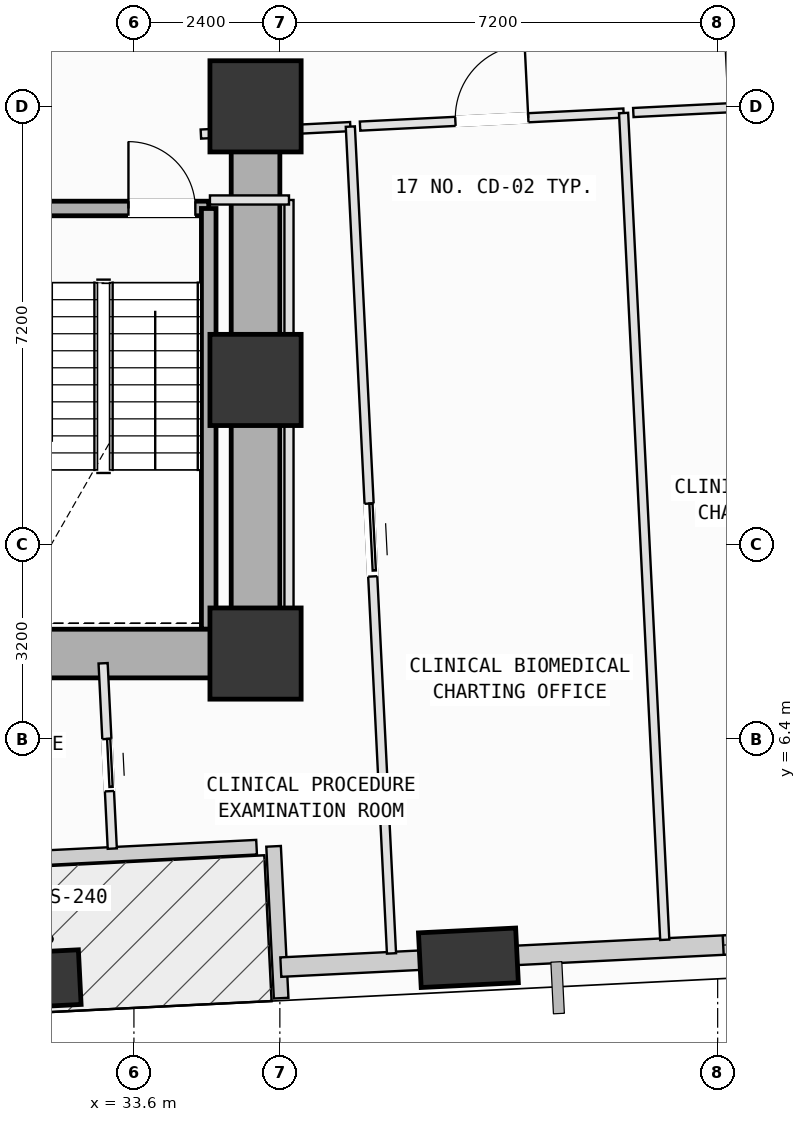
"""IFC4 building model, lengths in metres.
Left out: names, types, materials, properties, quantities, classifications, styles, units other than length and angle.
Written with IfcOpenShell. Run it as: python <this file> out.ifc"""

import sys

from ifc_helpers import new_model, si_unit, direction, frame, frame_2d, origin, origin_2d, place, context, subcontext, project, spatial, rectangle, extrude, element, fill, save


model = new_model("IFC4")
c1 = context("Model", 3, precision=1e-05, world=origin(), true_north=direction((0.0, 1.0)))
c2 = subcontext(c1, "Body", "Model", "MODEL_VIEW")
j1 = project(units=[si_unit("LENGTHUNIT", "METRE"), si_unit("PLANEANGLEUNIT", "RADIAN")], contexts=[c1])
p1 = place(None, origin())
s1 = spatial("IfcSite", under=j1, at=p1, CompositionType="ELEMENT")
p2 = place(p1, origin())
s2 = spatial("IfcBuilding", under=s1, at=p2, CompositionType="ELEMENT")
p3 = place(p2, frame((0.0, 0.0, 35.0)))
s3 = spatial("IfcBuildingStorey", under=s2, at=p3, CompositionType="ELEMENT", Elevation=35.0)
for number, where, z_axis, x_axis in (
    (1, (35.6, 7.8, 0.0), (0.0, 0.0, 1.0), (1.0, 0.0, 0.0)),
    (2, (35.6, 12.3, 0.0), (0.0, 0.0, 1.0), (1.0, 0.0, 0.0)),
    (3, (35.6, 16.8, 0.0), (0.0, 0.0, 1.0), (1.0, 0.0, 0.0)),
):
    element("IfcColumn", number, at=place(p3, frame(where, z_axis=z_axis, x_axis=x_axis)), inside=s3, PredefinedType="COLUMN", context=c2, shape_type="SweptSolid", body=[
        extrude(rectangle(XDim=1.5, YDim=1.5, at=origin_2d()), origin(), (0.0, 0.0, 1.0), 4.0),
    ])
p4 = place(p3, frame((31.91, 2.438, 0.002), z_axis=(0.092332687051, -0.006204172648, 0.995708884737), x_axis=(0.017562948544, 0.999835172037, 0.004601260333)))
e4 = element("IfcColumn", 4, at=p4, inside=s3, PredefinedType="COLUMN", context=c2, shape_type="SweptSolid", body=[
    extrude(rectangle(XDim=1.6, YDim=0.9, at=origin_2d()), origin(), (0.0, 0.0, 1.0), 4.014),
])
p5 = place(p3, frame((39.101, 2.796, 0.002), z_axis=(0.090620596554, 0.023415389043, 0.995610178251), x_axis=(-0.297792329454, 0.954619333029, 0.004653764671)))
e5 = element("IfcColumn", 5, at=p5, inside=s3, PredefinedType="COLUMN", context=c2, shape_type="SweptSolid", body=[
    extrude(rectangle(XDim=1.6, YDim=0.9, at=origin_2d()), origin(), (0.0, 0.0, 1.0), 4.014),
])
p6 = place(p3, frame((35.617, 4.615, 0.0), z_axis=(0.0, 0.0, 1.0), x_axis=(-0.998763945983, -0.04970493139, 0.0)))
e6 = element("IfcWall", 6, at=p6, inside=s3, PredefinedType="SOLIDWALL", context=c2, shape_type="SweptSolid", body=[
    extrude(rectangle(XDim=6.96, YDim=0.24, at=frame_2d((3.48, 0.0))), origin(), (0.0, 0.0, 1.0), 3.165),
])
p7 = place(p6, frame((4.264, 0.0, 0.0)))
e7 = element("IfcOpeningElement", 7, at=p7, cuts=e6, PredefinedType="OPENING", context=c2, shape_type="SweptSolid", body=[
    extrude(rectangle(XDim=1.1, YDim=2.15, at=frame_2d((0.55, 1.075))), frame((0.0, 0.13, 0.0), z_axis=(0.0, -1.0, 0.0), x_axis=(1.0, 0.0, 0.0)), (0.0, 0.0, 1.0), 0.26),
])
p8 = place(p3, frame((36.021, 2.132, 0.0), z_axis=(0.0, 0.0, 1.0), x_axis=(-0.049708688114, 0.998763759017, 0.0)))
e8 = element("IfcWall", 8, at=p8, inside=s3, PredefinedType="SOLIDWALL", context=c2, shape_type="SweptSolid", body=[
    extrude(rectangle(XDim=2.5, YDim=0.24, at=frame_2d((1.25, 0.0))), origin(), (0.0, 0.0, 1.0), 3.165),
])
p9 = place(p3, frame((38.679, 2.775, 0.0), z_axis=(0.0, 0.0, 1.0), x_axis=(-0.998758724052, -0.049809749348, 0.0)))
e9 = element("IfcWall", 9, at=p9, inside=s3, PredefinedType="SOLIDWALL", context=c2, shape_type="SweptSolid", body=[
    extrude(rectangle(XDim=2.667, YDim=0.32, at=frame_2d((1.333, 0.0))), origin(), (0.0, 0.0, 1.0), 3.145),
])
p10 = place(p3, frame((45.876, 3.134, 0.0), z_axis=(0.0, 0.0, 1.0), x_axis=(-0.998764196625, -0.049699894762, 0.0)))
e10 = element("IfcWall", 10, at=p10, inside=s3, PredefinedType="SOLIDWALL", context=c2, shape_type="SweptSolid", body=[
    extrude(rectangle(XDim=5.993, YDim=0.32, at=frame_2d((2.997, 0.0))), origin(), (0.0, 0.0, 1.0), 3.145),
])
p11 = place(p10, frame((0.588, 0.0, 0.75)))
e11 = element("IfcOpeningElement", 11, at=p11, cuts=e10, PredefinedType="OPENING", context=c2, shape_type="SweptSolid", body=[
    extrude(rectangle(XDim=2.0, YDim=1.95, at=frame_2d((1.0, 0.975))), frame((0.0, 0.17, 0.0), z_axis=(0.0, -1.0, 0.0), x_axis=(1.0, 0.0, 0.0)), (0.0, 0.0, 1.0), 0.34),
])
p12 = place(p3, frame((31.37, 15.12, 0.0), z_axis=(0.0, 0.0, 1.0), x_axis=(1.0, 0.0, 0.0)))
e12 = element("IfcWall", 12, at=p12, inside=s3, PredefinedType="SOLIDWALL", context=c2, shape_type="SweptSolid", body=[
    extrude(rectangle(XDim=3.46, YDim=0.24, at=frame_2d((1.73, 0.0))), origin(), (0.0, 0.0, 1.0), 3.78),
])
p13 = place(p12, frame((2.14, 0.0, 0.0)))
e13 = element("IfcOpeningElement", 13, at=p13, cuts=e12, PredefinedType="OPENING", context=c2, shape_type="SweptSolid", body=[
    extrude(rectangle(XDim=1.1, YDim=2.15, at=frame_2d((0.55, 1.075))), frame((0.0, 0.13, 0.0), z_axis=(0.0, -1.0, 0.0), x_axis=(1.0, 0.0, 0.0)), (0.0, 0.0, 1.0), 0.26),
])
p14 = place(p3, frame((34.83, 15.12, 0.0), z_axis=(0.0, 0.0, 1.0), x_axis=(0.0, -1.0, 0.0)))
e14 = element("IfcWall", 14, at=p14, inside=s3, PredefinedType="SOLIDWALL", context=c2, shape_type="SweptSolid", body=[
    extrude(rectangle(XDim=6.92, YDim=0.24, at=frame_2d((3.46, 0.0))), origin(), (0.0, 0.0, 1.0), 3.78),
])
p15 = place(p3, frame((24.8, 7.8, 0.0), z_axis=(0.0, 0.0, 1.0), x_axis=(1.0, 0.0, 0.0)))
e15 = element("IfcWall", 15, at=p15, inside=s3, PredefinedType="SHEAR", context=c2, shape_type="SweptSolid", body=[
    extrude(rectangle(XDim=10.8, YDim=0.8, at=frame_2d((5.4, 0.0))), origin(), (0.0, 0.0, 1.0), 3.78),
])
p16 = place(p3, frame((35.6, 7.8, 0.0), z_axis=(0.0, 0.0, 1.0), x_axis=(0.0, 1.0, 0.0)))
e16 = element("IfcWall", 16, at=p16, inside=s3, PredefinedType="SHEAR", context=c2, shape_type="SweptSolid", body=[
    extrude(rectangle(XDim=9.0, YDim=0.8, at=frame_2d((4.5, 0.0))), origin(), (0.0, 0.0, 1.0), 3.78),
])
p17 = place(p3, frame((33.093, 7.64, 0.0), z_axis=(0.0, 0.0, 1.0), x_axis=(0.049442819508, -0.998776955881, 0.0)))
e17 = element("IfcWall", 17, at=p17, inside=s3, PredefinedType="PARTITIONING", context=c2, shape_type="SweptSolid", body=[
    extrude(rectangle(XDim=3.052, YDim=0.15, at=frame_2d((1.526, 0.0))), origin(), (0.0, 0.0, 1.0), 3.78),
])
p18 = place(p17, frame((1.246, 0.0, 0.0)))
e18 = element("IfcOpeningElement", 18, at=p18, cuts=e17, PredefinedType="OPENING", context=c2, shape_type="SweptSolid", body=[
    extrude(rectangle(XDim=0.86, YDim=2.06, at=frame_2d((0.43, 1.03))), frame((0.0, 0.085, 0.0), z_axis=(0.0, -1.0, 0.0), x_axis=(1.0, 0.0, 0.0)), (0.0, 0.0, 1.0), 0.17),
])
p19 = place(p3, frame((35.6, 7.5, 0.0), z_axis=(0.0, 0.0, 1.0), x_axis=(1.0, 0.0, 0.0)))
e19 = element("IfcWall", 19, at=p19, inside=s3, PredefinedType="PARTITIONING", context=c2, shape_type="SweptSolid", body=[
    extrude(rectangle(XDim=0.55, YDim=0.15, at=frame_2d((0.275, 0.0))), origin(), (0.0, 0.0, 1.0), 2.865),
])
p20 = place(p3, frame((36.15, 7.5, 0.0), z_axis=(0.0, 0.0, 1.0), x_axis=(0.0, 1.0, 0.0)))
e20 = element("IfcWall", 20, at=p20, inside=s3, PredefinedType="PARTITIONING", context=c2, shape_type="SweptSolid", body=[
    extrude(rectangle(XDim=7.76, YDim=0.15, at=frame_2d((3.88, 0.0))), origin(), (0.0, 0.0, 1.0), 3.78),
])
p21 = place(p3, frame((36.15, 15.26, 0.0), z_axis=(0.0, 0.0, 1.0), x_axis=(-1.0, 0.0, 0.0)))
e21 = element("IfcWall", 21, at=p21, inside=s3, PredefinedType="PARTITIONING", context=c2, shape_type="SweptSolid", body=[
    extrude(rectangle(XDim=1.3, YDim=0.15, at=frame_2d((0.65, 0.0))), origin(), (0.0, 0.0, 1.0), 3.78),
])
p22 = place(p3, frame((34.701, 16.344, 0.0), z_axis=(0.0, 0.0, 1.0), x_axis=(0.998749368523, 0.049996988651, 0.0)))
e22 = element("IfcWall", 22, at=p22, inside=s3, PredefinedType="PARTITIONING", context=c2, shape_type="SweptSolid", body=[
    extrude(rectangle(XDim=2.461, YDim=0.15, at=frame_2d((1.23, 0.0))), origin(), (0.0, 0.0, 1.0), 2.865),
])
p23 = place(p3, frame((37.159, 16.467, 0.0), z_axis=(0.0, 0.0, 1.0), x_axis=(0.049721198108, -0.998763136313, 0.0)))
e23 = element("IfcWall", 23, at=p23, inside=s3, PredefinedType="PARTITIONING", context=c2, shape_type="SweptSolid", body=[
    extrude(rectangle(XDim=13.616, YDim=0.15, at=frame_2d((6.808, 0.0))), origin(), (0.0, 0.0, 1.0), 3.78),
])
p24 = place(p23, frame((6.208, 0.0, 0.0)))
e24 = element("IfcOpeningElement", 24, at=p24, cuts=e23, PredefinedType="OPENING", context=c2, shape_type="SweptSolid", body=[
    extrude(rectangle(XDim=1.2, YDim=2.15, at=frame_2d((0.6, 1.075))), frame((0.0, 0.085, 0.0), z_axis=(0.0, -1.0, 0.0), x_axis=(1.0, 0.0, 0.0)), (0.0, 0.0, 1.0), 0.17),
])
p25 = place(p3, frame((37.319, 16.475, 0.0), z_axis=(0.0, 0.0, 1.0), x_axis=(0.99877357427, 0.049511082997, 0.0)))
e25 = element("IfcWall", 25, at=p25, inside=s3, PredefinedType="PARTITIONING", context=c2, shape_type="SweptSolid", body=[
    extrude(rectangle(XDim=4.339, YDim=0.15, at=frame_2d((2.17, 0.0))), origin(), (0.0, 0.0, 1.0), 3.78),
])
p26 = place(p25, frame((1.57, 0.0, 0.0)))
e26 = element("IfcOpeningElement", 26, at=p26, cuts=e25, PredefinedType="OPENING", context=c2, shape_type="SweptSolid", body=[
    extrude(rectangle(XDim=1.2, YDim=2.15, at=frame_2d((0.6, 1.075))), frame((0.0, 0.085, 0.0), z_axis=(0.0, -1.0, 0.0), x_axis=(1.0, 0.0, 0.0)), (0.0, 0.0, 1.0), 0.17),
])
p27 = place(p3, frame((41.653, 16.69, 0.0), z_axis=(0.0, 0.0, 1.0), x_axis=(0.049725650615, -0.998762914645, 0.0)))
e27 = element("IfcWall", 27, at=p27, inside=s3, PredefinedType="PARTITIONING", context=c2, shape_type="SweptSolid", body=[
    extrude(rectangle(XDim=13.615, YDim=0.15, at=frame_2d((6.807, 0.0))), origin(), (0.0, 0.0, 1.0), 3.78),
])
p28 = place(p3, frame((39.902, 2.606, 0.0), z_axis=(0.0, 0.0, 1.0), x_axis=(-0.998774811243, -0.049486123578, 0.0)))
e28 = element("IfcWall", 28, at=p28, inside=s3, PredefinedType="PARTITIONING", context=c2, shape_type="SweptSolid", body=[
    extrude(rectangle(XDim=1.214, YDim=0.15, at=frame_2d((0.607, 0.0))), origin(), (0.0, 0.0, 1.0), 3.145),
])
p29 = place(p3, frame((41.813, 16.698, 0.0), z_axis=(0.0, 0.0, 1.0), x_axis=(0.998760181767, 0.049780511425, 0.0)))
e29 = element("IfcWall", 29, at=p29, inside=s3, PredefinedType="PARTITIONING", context=c2, shape_type="SweptSolid", body=[
    extrude(rectangle(XDim=4.34, YDim=0.15, at=frame_2d((2.17, 0.0))), origin(), (0.0, 0.0, 1.0), 3.78),
])
p30 = place(p29, frame((1.57, 0.0, 0.0)))
e30 = element("IfcOpeningElement", 30, at=p30, cuts=e29, PredefinedType="OPENING", context=c2, shape_type="SweptSolid", body=[
    extrude(rectangle(XDim=1.2, YDim=2.15, at=frame_2d((0.6, 1.075))), frame((0.0, 0.085, 0.0), z_axis=(0.0, -1.0, 0.0), x_axis=(1.0, 0.0, 0.0)), (0.0, 0.0, 1.0), 0.17),
])
p31 = place(p11, origin())
e31 = element("IfcWindow", 31, at=p31, inside=s3, PartitioningType="SINGLE_PANEL", PredefinedType="WINDOW", context=c2, shape_type="SweptSolid", body=[
    extrude(rectangle(XDim=2.0, YDim=1.95, at=frame_2d((1.0, 0.975))), frame((0.0, 0.03, 0.0), z_axis=(0.0, -1.0, 0.0), x_axis=(1.0, 0.0, 0.0)), (0.0, 0.0, 1.0), 0.06),
])
fill(e11, e31)
p32 = place(p13, origin())
e32 = element("IfcDoor", 32, at=p32, inside=s3, OperationType="SINGLE_SWING_LEFT", PredefinedType="DOOR", context=c2, shape_type="SweptSolid", body=[
    extrude(rectangle(XDim=1.1, YDim=2.15, at=frame_2d((0.55, 1.075))), frame((0.0, 0.025, 0.0), z_axis=(0.0, -1.0, 0.0), x_axis=(1.0, 0.0, 0.0)), (0.0, 0.0, 1.0), 0.05),
])
fill(e13, e32)
p33 = place(p26, origin())
e33 = element("IfcDoor", 33, at=p33, inside=s3, OperationType="SINGLE_SWING_RIGHT", PredefinedType="DOOR", context=c2, shape_type="SweptSolid", body=[
    extrude(rectangle(XDim=1.2, YDim=2.15, at=frame_2d((0.6, 1.075))), frame((0.0, 0.025, 0.0), z_axis=(0.0, -1.0, 0.0), x_axis=(1.0, 0.0, 0.0)), (0.0, 0.0, 1.0), 0.05),
])
fill(e26, e33)
p34 = place(p24, origin())
e34 = element("IfcDoor", 34, at=p34, inside=s3, OperationType="SLIDING_TO_LEFT", PredefinedType="DOOR", context=c2, shape_type="SweptSolid", body=[
    extrude(rectangle(XDim=1.2, YDim=2.15, at=frame_2d((0.6, 1.075))), frame((0.0, 0.025, 0.0), z_axis=(0.0, -1.0, 0.0), x_axis=(1.0, 0.0, 0.0)), (0.0, 0.0, 1.0), 0.05),
])
fill(e24, e34)
p35 = place(p18, origin())
e35 = element("IfcDoor", 35, at=p35, inside=s3, OperationType="SLIDING_TO_LEFT", PredefinedType="DOOR", context=c2, shape_type="SweptSolid", body=[
    extrude(rectangle(XDim=0.86, YDim=2.06, at=frame_2d((0.43, 1.03))), frame((0.0, 0.025, 0.0), z_axis=(0.0, -1.0, 0.0), x_axis=(1.0, 0.0, 0.0)), (0.0, 0.0, 1.0), 0.05),
])
fill(e18, e35)
save(model, sys.argv[1])
